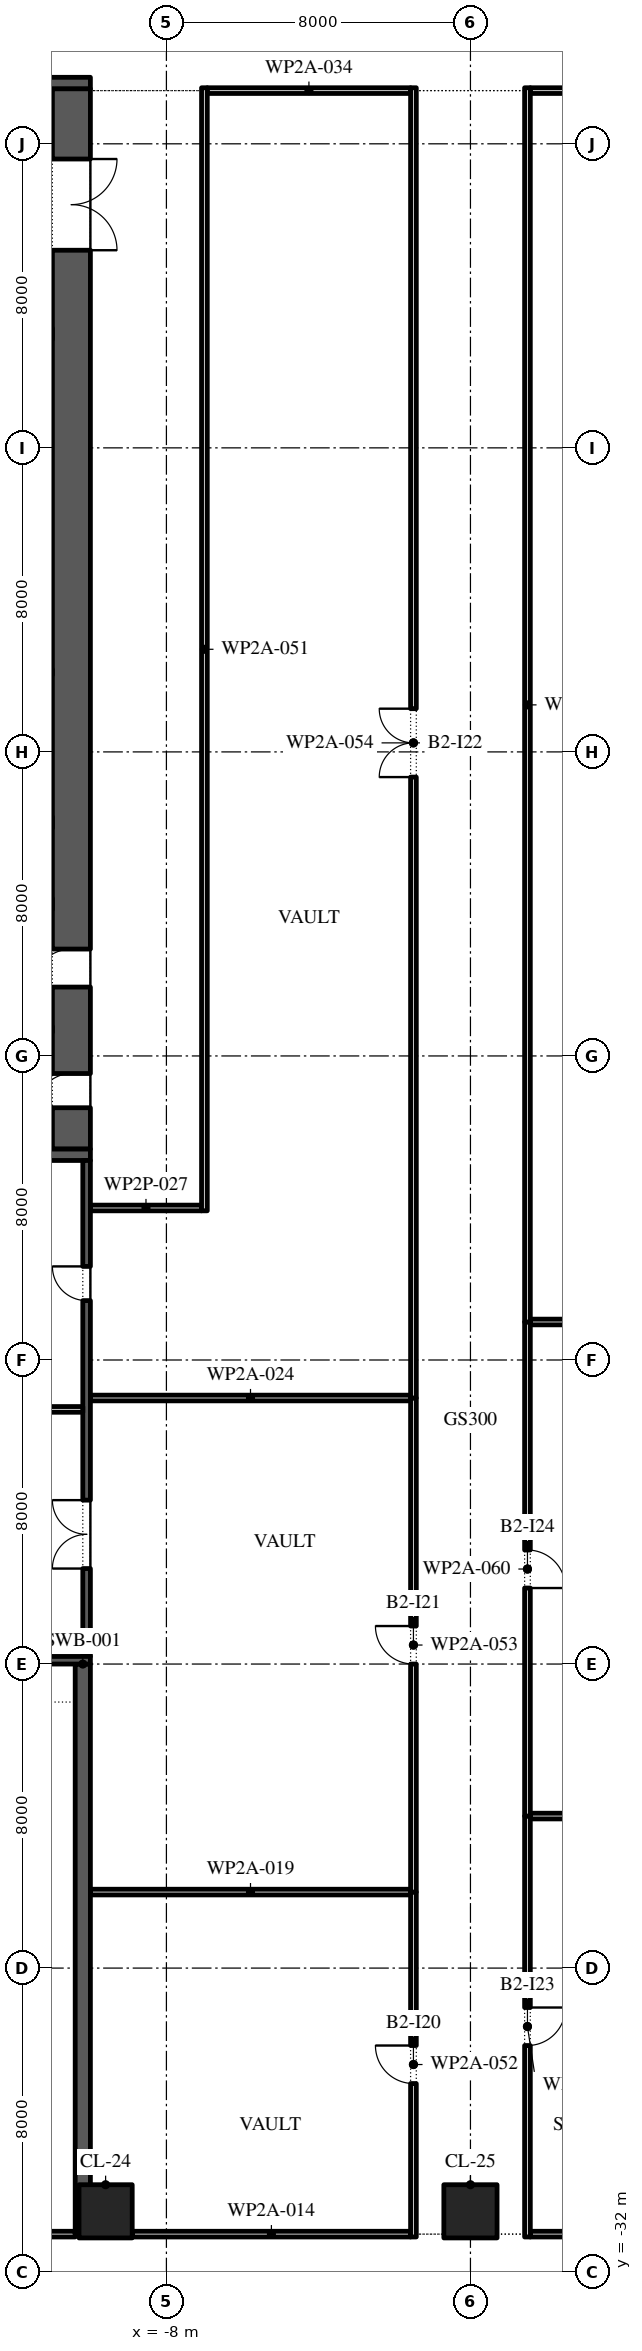
"""IFC4 building model, lengths in metres.
Left out: names, types, materials, properties, quantities, classifications, styles, units other than length and angle.
Written with IfcOpenShell. Run it as: python <this file> out.ifc"""

import sys

from ifc_helpers import new_model, si_unit, direction, frame, frame_2d, origin, origin_2d, place, context, subcontext, project, spatial, rectangle, extrude, element, fill, save


model = new_model("IFC4")
c1 = context("Model", 3, precision=1e-05, world=origin(), true_north=direction((0.0, 1.0)))
c2 = subcontext(c1, "Body", "Model", "MODEL_VIEW")
j1 = project(units=[si_unit("LENGTHUNIT", "METRE"), si_unit("PLANEANGLEUNIT", "RADIAN")], contexts=[c1])
p1 = place(None, origin())
s1 = spatial("IfcSite", under=j1, at=p1, CompositionType="ELEMENT")
p2 = place(p1, origin())
s2 = spatial("IfcBuilding", under=s1, at=p2, CompositionType="ELEMENT")
p3 = place(p2, frame((0.0, 0.0, -10.4)))
s3 = spatial("IfcBuildingStorey", under=s2, at=p3, CompositionType="ELEMENT", Elevation=-10.4)
for number, where, z_axis, x_axis in (
    (1, (-9.6, -30.4, -0.3), (0.0, 0.0, 1.0), (1.0, 0.0, 0.0)),
    (2, (0.0, -30.4, -0.3), (0.0, 0.0, 1.0), (1.0, 0.0, 0.0)),
):
    element("IfcColumn", number, at=place(p3, frame(where, z_axis=z_axis, x_axis=x_axis)), inside=s3, PredefinedType="COLUMN", context=c2, shape_type="SweptSolid", body=[
        extrude(rectangle(XDim=1.4, YDim=1.4, at=origin_2d()), origin(), (0.0, 0.0, 1.0), 5.5),
    ])
p4 = place(p3, frame((-10.2, -31.0, -0.3), z_axis=(0.0, 0.0, 1.0), x_axis=(0.0, 1.0, 0.0)))
e3 = element("IfcWall", 3, at=p4, inside=s3, PredefinedType="SHEAR", context=c2, shape_type="SweptSolid", body=[
    extrude(rectangle(XDim=15.0, YDim=0.4, at=frame_2d((7.5, 0.0))), origin(), (0.0, 0.0, 1.0), 5.2),
])
p5 = place(p3, frame((-10.5, -2.45, 0.0), z_axis=(0.0, 0.0, 1.0), x_axis=(0.0, 1.0, 0.0)))
e4 = element("IfcWall", 4, at=p5, inside=s3, PredefinedType="SHEAR", context=c2, shape_type="SweptSolid", body=[
    extrude(rectangle(XDim=27.9, YDim=1.0, at=frame_2d((13.95, 0.0))), origin(), (0.0, 0.0, 1.0), 4.9),
])
p6 = place(p5, frame((23.65, 0.0, 0.0)))
e5 = element("IfcOpeningElement", 5, at=p6, cuts=e4, PredefinedType="OPENING", context=c2, shape_type="SweptSolid", body=[
    extrude(rectangle(XDim=2.4, YDim=2.1, at=frame_2d((1.2, 1.05))), frame((0.0, 0.51, 0.0), z_axis=(0.0, -1.0, 0.0), x_axis=(1.0, 0.0, 0.0)), (0.0, 0.0, 1.0), 1.02),
])
p7 = place(p5, frame((1.087, 0.0, 0.0)))
e6 = element("IfcOpeningElement", 6, at=p7, cuts=e4, PredefinedType="OPENING", context=c2, shape_type="SweptSolid", body=[
    extrude(rectangle(XDim=0.9, YDim=2.1, at=frame_2d((0.45, 1.05))), frame((0.0, 0.51, 0.0), z_axis=(0.0, -1.0, 0.0), x_axis=(1.0, 0.0, 0.0)), (0.0, 0.0, 1.0), 1.02),
])
p8 = place(p5, frame((4.262, 0.0, 0.0)))
e7 = element("IfcOpeningElement", 7, at=p8, cuts=e4, PredefinedType="OPENING", context=c2, shape_type="SweptSolid", body=[
    extrude(rectangle(XDim=1.0, YDim=2.1, at=frame_2d((0.5, 1.05))), frame((0.0, 0.51, 0.0), z_axis=(0.0, -1.0, 0.0), x_axis=(1.0, 0.0, 0.0)), (0.0, 0.0, 1.0), 1.02),
])
for number, where, z_axis, x_axis in (
    (8, (-22.0, -2.6, 0.0), (0.0, 0.0, 1.0), (1.0, 0.0, 0.0)),
    (9, (-22.0, 25.6, 0.0), (0.0, 0.0, 1.0), (1.0, 0.0, 0.0)),
):
    element("IfcWall", number, at=place(p3, frame(where, z_axis=z_axis, x_axis=x_axis)), inside=s3, PredefinedType="SHEAR", context=c2, shape_type="SweptSolid", body=[
        extrude(rectangle(XDim=12.0, YDim=0.3, at=frame_2d((6.0, 0.0))), origin(), (0.0, 0.0, 1.0), 4.9),
    ])
p9 = place(p3, frame((-10.1, -15.8, 0.0), z_axis=(0.0, 0.0, 1.0), x_axis=(0.0, 1.0, 0.0)))
e10 = element("IfcWall", 10, at=p9, inside=s3, PredefinedType="SHEAR", context=c2, shape_type="SweptSolid", body=[
    extrude(rectangle(XDim=13.05, YDim=0.2, at=frame_2d((6.525, 0.0))), origin(), (0.0, 0.0, 1.0), 4.9),
])
p10 = place(p9, frame((2.312, 0.0, 0.0)))
e11 = element("IfcOpeningElement", 11, at=p10, cuts=e10, PredefinedType="OPENING", context=c2, shape_type="SweptSolid", body=[
    extrude(rectangle(XDim=1.8, YDim=2.4, at=frame_2d((0.9, 1.2))), frame((0.0, 0.11, 0.0), z_axis=(0.0, -1.0, 0.0), x_axis=(1.0, 0.0, 0.0)), (0.0, 0.0, 1.0), 0.22),
])
p11 = place(p9, frame((9.363, 0.0, 0.0)))
e12 = element("IfcOpeningElement", 12, at=p11, cuts=e10, PredefinedType="OPENING", context=c2, shape_type="SweptSolid", body=[
    extrude(rectangle(XDim=0.9, YDim=2.1, at=frame_2d((0.45, 1.05))), frame((0.0, 0.11, 0.0), z_axis=(0.0, -1.0, 0.0), x_axis=(1.0, 0.0, 0.0)), (0.0, 0.0, 1.0), 0.22),
])
p12 = place(p3, frame((-22.0, -15.9, 0.0), z_axis=(0.0, 0.0, 1.0), x_axis=(1.0, 0.0, 0.0)))
e13 = element("IfcWall", 13, at=p12, inside=s3, PredefinedType="SHEAR", context=c2, shape_type="SweptSolid", body=[
    extrude(rectangle(XDim=12.0, YDim=0.2, at=frame_2d((6.0, 0.0))), origin(), (0.0, 0.0, 1.0), 4.9),
])
p13 = place(p3, frame((-21.8, -9.3, 0.0), z_axis=(0.0, 0.0, 1.0), x_axis=(1.0, 0.0, 0.0)))
e14 = element("IfcWall", 14, at=p13, inside=s3, PredefinedType="PARTITIONING", context=c2, shape_type="SweptSolid", body=[
    extrude(rectangle(XDim=11.6, YDim=0.15, at=frame_2d((5.8, 0.0))), origin(), (0.0, 0.0, 1.0), 4.9),
])
p14 = place(p3, frame((-18.5, -31.0, 0.0), z_axis=(0.0, 0.0, 1.0), x_axis=(1.0, 0.0, 0.0)))
e15 = element("IfcWall", 15, at=p14, inside=s3, PredefinedType="PARTITIONING", context=c2, shape_type="SweptSolid", body=[
    extrude(rectangle(XDim=8.1, YDim=0.15, at=frame_2d((4.05, 0.0))), origin(), (0.0, 0.0, 1.0), 4.9),
])
for number, where, z_axis, x_axis in (
    (16, (-8.9, -31.0, 0.0), (0.0, 0.0, 1.0), (1.0, 0.0, 0.0)),
    (17, (1.575, -31.0, 0.0), (0.0, 0.0, 1.0), (1.0, 0.0, 0.0)),
):
    element("IfcWall", number, at=place(p3, frame(where, z_axis=z_axis, x_axis=x_axis)), inside=s3, PredefinedType="PARTITIONING", context=c2, shape_type="SweptSolid", body=[
        extrude(rectangle(XDim=7.325, YDim=0.15, at=frame_2d((3.663, 0.0))), origin(), (0.0, 0.0, 1.0), 4.9),
    ])
for number, where, z_axis, x_axis in (
    (18, (-10.0, -22.0, 0.0), (0.0, 0.0, 1.0), (1.0, 0.0, 0.0)),
    (19, (1.575, -20.0, 0.0), (0.0, 0.0, 1.0), (1.0, 0.0, 0.0)),
    (20, (-10.0, -9.0, 0.0), (0.0, 0.0, 1.0), (1.0, 0.0, 0.0)),
    (21, (1.575, -7.0, 0.0), (0.0, 0.0, 1.0), (1.0, 0.0, 0.0)),
):
    element("IfcWall", number, at=place(p3, frame(where, z_axis=z_axis, x_axis=x_axis)), inside=s3, PredefinedType="PARTITIONING", context=c2, shape_type="SweptSolid", body=[
        extrude(rectangle(XDim=8.425, YDim=0.15, at=frame_2d((4.212, 0.0))), origin(), (0.0, 0.0, 1.0), 4.9),
    ])
p15 = place(p3, frame((-10.0, -4.0, 0.0), z_axis=(0.0, 0.0, 1.0), x_axis=(1.0, 0.0, 0.0)))
e22 = element("IfcWall", 22, at=p15, inside=s3, PredefinedType="PARTITIONING", context=c2, shape_type="SweptSolid", body=[
    extrude(rectangle(XDim=2.925, YDim=0.15, at=frame_2d((1.462, 0.0))), origin(), (0.0, 0.0, 1.0), 3.93),
])
for number, where, z_axis, x_axis in (
    (23, (-6.925, 25.4, 0.0), (0.0, 0.0, 1.0), (1.0, 0.0, 0.0)),
    (24, (1.575, 25.4, 0.0), (0.0, 0.0, 1.0), (1.0, 0.0, 0.0)),
):
    element("IfcWall", number, at=place(p3, frame(where, z_axis=z_axis, x_axis=x_axis)), inside=s3, PredefinedType="PARTITIONING", context=c2, shape_type="SweptSolid", body=[
        extrude(rectangle(XDim=5.35, YDim=0.15, at=frame_2d((2.675, 0.0))), origin(), (0.0, 0.0, 1.0), 4.9),
    ])
p16 = place(p3, frame((-7.0, -4.075, 0.0), z_axis=(0.0, 0.0, 1.0), x_axis=(0.0, 1.0, 0.0)))
e25 = element("IfcWall", 25, at=p16, inside=s3, PredefinedType="PARTITIONING", context=c2, shape_type="SweptSolid", body=[
    extrude(rectangle(XDim=29.55, YDim=0.15, at=frame_2d((14.775, 0.0))), origin(), (0.0, 0.0, 1.0), 4.9),
])
p17 = place(p3, frame((-1.5, -31.075, 0.0), z_axis=(0.0, 0.0, 1.0), x_axis=(0.0, 1.0, 0.0)))
e26 = element("IfcWall", 26, at=p17, inside=s3, PredefinedType="PARTITIONING", context=c2, shape_type="SweptSolid", body=[
    extrude(rectangle(XDim=9.075, YDim=0.15, at=frame_2d((4.538, 0.0))), origin(), (0.0, 0.0, 1.0), 4.9),
])
p18 = place(p17, frame((4.038, 0.0, 0.0)))
e27 = element("IfcOpeningElement", 27, at=p18, cuts=e26, PredefinedType="OPENING", context=c2, shape_type="SweptSolid", body=[
    extrude(rectangle(XDim=1.0, YDim=2.1, at=frame_2d((0.5, 1.05))), frame((0.0, 0.085, 0.0), z_axis=(0.0, -1.0, 0.0), x_axis=(1.0, 0.0, 0.0)), (0.0, 0.0, 1.0), 0.17),
])
p19 = place(p3, frame((-1.5, -22.0, 0.0), z_axis=(0.0, 0.0, 1.0), x_axis=(0.0, 1.0, 0.0)))
e28 = element("IfcWall", 28, at=p19, inside=s3, PredefinedType="PARTITIONING", context=c2, shape_type="SweptSolid", body=[
    extrude(rectangle(XDim=13.0, YDim=0.15, at=frame_2d((6.5, 0.0))), origin(), (0.0, 0.0, 1.0), 4.9),
])
p20 = place(p19, frame((6.0, 0.0, 0.0)))
e29 = element("IfcOpeningElement", 29, at=p20, cuts=e28, PredefinedType="OPENING", context=c2, shape_type="SweptSolid", body=[
    extrude(rectangle(XDim=1.0, YDim=2.1, at=frame_2d((0.5, 1.05))), frame((0.0, 0.085, 0.0), z_axis=(0.0, -1.0, 0.0), x_axis=(1.0, 0.0, 0.0)), (0.0, 0.0, 1.0), 0.17),
])
p21 = place(p3, frame((-1.5, -9.0, 0.0), z_axis=(0.0, 0.0, 1.0), x_axis=(0.0, 1.0, 0.0)))
e30 = element("IfcWall", 30, at=p21, inside=s3, PredefinedType="PARTITIONING", context=c2, shape_type="SweptSolid", body=[
    extrude(rectangle(XDim=34.475, YDim=0.15, at=frame_2d((17.238, 0.0))), origin(), (0.0, 0.0, 1.0), 4.9),
])
p22 = place(p21, frame((16.337, 0.0, 0.0)))
e31 = element("IfcOpeningElement", 31, at=p22, cuts=e30, PredefinedType="OPENING", context=c2, shape_type="SweptSolid", body=[
    extrude(rectangle(XDim=1.8, YDim=2.1, at=frame_2d((0.9, 1.05))), frame((0.0, 0.085, 0.0), z_axis=(0.0, -1.0, 0.0), x_axis=(1.0, 0.0, 0.0)), (0.0, 0.0, 1.0), 0.17),
])
p23 = place(p3, frame((1.5, -31.075, 0.0), z_axis=(0.0, 0.0, 1.0), x_axis=(0.0, 1.0, 0.0)))
e32 = element("IfcWall", 32, at=p23, inside=s3, PredefinedType="PARTITIONING", context=c2, shape_type="SweptSolid", body=[
    extrude(rectangle(XDim=11.075, YDim=0.15, at=frame_2d((5.538, 0.0))), origin(), (0.0, 0.0, 1.0), 4.9),
])
p24 = place(p23, frame((5.038, 0.0, 0.0)))
e33 = element("IfcOpeningElement", 33, at=p24, cuts=e32, PredefinedType="OPENING", context=c2, shape_type="SweptSolid", body=[
    extrude(rectangle(XDim=1.0, YDim=2.1, at=frame_2d((0.5, 1.05))), frame((0.0, 0.085, 0.0), z_axis=(0.0, -1.0, 0.0), x_axis=(1.0, 0.0, 0.0)), (0.0, 0.0, 1.0), 0.17),
])
p25 = place(p3, frame((1.5, -20.0, 0.0), z_axis=(0.0, 0.0, 1.0), x_axis=(0.0, 1.0, 0.0)))
e34 = element("IfcWall", 34, at=p25, inside=s3, PredefinedType="PARTITIONING", context=c2, shape_type="SweptSolid", body=[
    extrude(rectangle(XDim=13.0, YDim=0.15, at=frame_2d((6.5, 0.0))), origin(), (0.0, 0.0, 1.0), 4.9),
])
p26 = place(p25, frame((6.0, 0.0, 0.0)))
e35 = element("IfcOpeningElement", 35, at=p26, cuts=e34, PredefinedType="OPENING", context=c2, shape_type="SweptSolid", body=[
    extrude(rectangle(XDim=1.0, YDim=2.1, at=frame_2d((0.5, 1.05))), frame((0.0, 0.085, 0.0), z_axis=(0.0, -1.0, 0.0), x_axis=(1.0, 0.0, 0.0)), (0.0, 0.0, 1.0), 0.17),
])
p27 = place(p3, frame((1.5, -7.0, 0.0), z_axis=(0.0, 0.0, 1.0), x_axis=(0.0, 1.0, 0.0)))
e36 = element("IfcWall", 36, at=p27, inside=s3, PredefinedType="PARTITIONING", context=c2, shape_type="SweptSolid", body=[
    extrude(rectangle(XDim=32.475, YDim=0.15, at=frame_2d((16.238, 0.0))), origin(), (0.0, 0.0, 1.0), 4.9),
])
p28 = place(p6, frame((2.4, 0.0, 0.0), z_axis=(0.0, 0.0, 1.0), x_axis=(-1.0, 0.0, 0.0)))
e37 = element("IfcDoor", 37, at=p28, inside=s3, OperationType="DOUBLE_DOOR_SINGLE_SWING", PredefinedType="DOOR", context=c2, shape_type="SweptSolid", body=[
    extrude(rectangle(XDim=2.4, YDim=2.1, at=frame_2d((1.2, 1.05))), frame((0.0, 0.025, 0.0), z_axis=(0.0, -1.0, 0.0), x_axis=(1.0, 0.0, 0.0)), (0.0, 0.0, 1.0), 0.05),
])
fill(e5, e37)
p29 = place(p7, origin())
e38 = element("IfcDoor", 38, at=p29, inside=s3, OperationType="SINGLE_SWING_RIGHT", PredefinedType="DOOR", context=c2, shape_type="SweptSolid", body=[
    extrude(rectangle(XDim=0.9, YDim=2.1, at=frame_2d((0.45, 1.05))), frame((0.0, 0.5, 0.0), z_axis=(0.0, -1.0, 0.0), x_axis=(1.0, 0.0, 0.0)), (0.0, 0.0, 1.0), 0.05),
])
fill(e6, e38)
p30 = place(p8, origin())
e39 = element("IfcDoor", 39, at=p30, inside=s3, OperationType="SINGLE_SWING_RIGHT", PredefinedType="DOOR", context=c2, shape_type="SweptSolid", body=[
    extrude(rectangle(XDim=1.0, YDim=2.1, at=frame_2d((0.5, 1.05))), frame((0.0, 0.5, 0.0), z_axis=(0.0, -1.0, 0.0), x_axis=(1.0, 0.0, 0.0)), (0.0, 0.0, 1.0), 0.05),
])
fill(e7, e39)
p31 = place(p10, origin())
e40 = element("IfcDoor", 40, at=p31, inside=s3, OperationType="DOUBLE_DOOR_SINGLE_SWING", PredefinedType="DOOR", context=c2, shape_type="SweptSolid", body=[
    extrude(rectangle(XDim=1.8, YDim=2.4, at=frame_2d((0.9, 1.2))), frame((0.0, 0.1, 0.0), z_axis=(0.0, -1.0, 0.0), x_axis=(1.0, 0.0, 0.0)), (0.0, 0.0, 1.0), 0.05),
])
fill(e11, e40)
p32 = place(p11, origin())
e41 = element("IfcDoor", 41, at=p32, inside=s3, OperationType="SINGLE_SWING_LEFT", PredefinedType="DOOR", context=c2, shape_type="SweptSolid", body=[
    extrude(rectangle(XDim=0.9, YDim=2.1, at=frame_2d((0.45, 1.05))), frame((0.0, 0.1, 0.0), z_axis=(0.0, -1.0, 0.0), x_axis=(1.0, 0.0, 0.0)), (0.0, 0.0, 1.0), 0.05),
])
fill(e12, e41)
p33 = place(p18, origin())
e42 = element("IfcDoor", 42, at=p33, inside=s3, OperationType="SINGLE_SWING_LEFT", PredefinedType="DOOR", context=c2, shape_type="SweptSolid", body=[
    extrude(rectangle(XDim=1.0, YDim=2.1, at=frame_2d((0.5, 1.05))), frame((0.0, 0.025, 0.0), z_axis=(0.0, -1.0, 0.0), x_axis=(1.0, 0.0, 0.0)), (0.0, 0.0, 1.0), 0.05),
])
fill(e27, e42)
p34 = place(p20, origin())
e43 = element("IfcDoor", 43, at=p34, inside=s3, OperationType="SINGLE_SWING_LEFT", PredefinedType="DOOR", context=c2, shape_type="SweptSolid", body=[
    extrude(rectangle(XDim=1.0, YDim=2.1, at=frame_2d((0.5, 1.05))), frame((0.0, 0.025, 0.0), z_axis=(0.0, -1.0, 0.0), x_axis=(1.0, 0.0, 0.0)), (0.0, 0.0, 1.0), 0.05),
])
fill(e29, e43)
p35 = place(p22, origin())
e44 = element("IfcDoor", 44, at=p35, inside=s3, OperationType="SINGLE_SWING_LEFT", PredefinedType="DOOR", context=c2, shape_type="SweptSolid", body=[
    extrude(rectangle(XDim=1.8, YDim=2.1, at=frame_2d((0.9, 1.05))), frame((0.0, 0.025, 0.0), z_axis=(0.0, -1.0, 0.0), x_axis=(1.0, 0.0, 0.0)), (0.0, 0.0, 1.0), 0.05),
])
fill(e31, e44)
p36 = place(p24, frame((1.0, 0.0, 0.0), z_axis=(0.0, 0.0, 1.0), x_axis=(-1.0, 0.0, 0.0)))
e45 = element("IfcDoor", 45, at=p36, inside=s3, OperationType="SINGLE_SWING_RIGHT", PredefinedType="DOOR", context=c2, shape_type="SweptSolid", body=[
    extrude(rectangle(XDim=1.0, YDim=2.1, at=frame_2d((0.5, 1.05))), frame((0.0, 0.025, 0.0), z_axis=(0.0, -1.0, 0.0), x_axis=(1.0, 0.0, 0.0)), (0.0, 0.0, 1.0), 0.05),
])
fill(e33, e45)
p37 = place(p26, frame((1.0, 0.0, 0.0), z_axis=(0.0, 0.0, 1.0), x_axis=(-1.0, 0.0, 0.0)))
e46 = element("IfcDoor", 46, at=p37, inside=s3, OperationType="SINGLE_SWING_LEFT", PredefinedType="DOOR", context=c2, shape_type="SweptSolid", body=[
    extrude(rectangle(XDim=1.0, YDim=2.1, at=frame_2d((0.5, 1.05))), frame((0.0, 0.025, 0.0), z_axis=(0.0, -1.0, 0.0), x_axis=(1.0, 0.0, 0.0)), (0.0, 0.0, 1.0), 0.05),
])
fill(e35, e46)
save(model, sys.argv[1])
